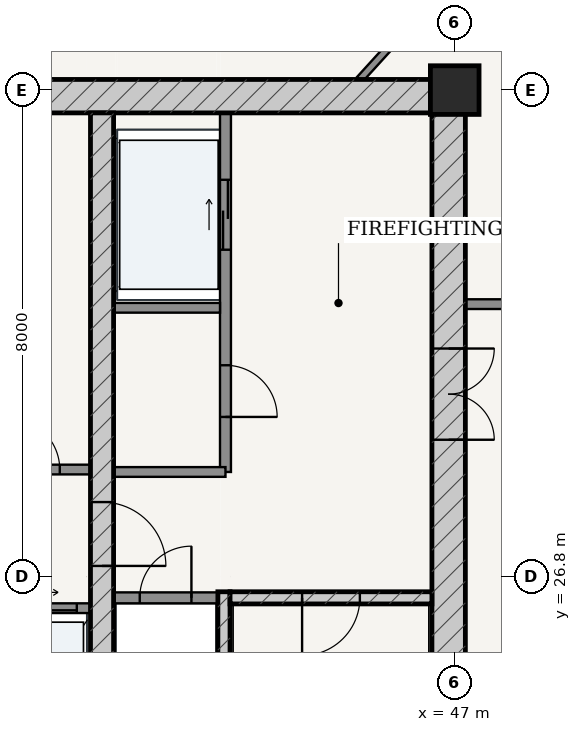
"""IFC4 building model, lengths in metres.
Left out: names, types, materials, properties, quantities, classifications, styles, units other than length and angle.
Written with IfcOpenShell. Run it as: python <this file> out.ifc"""

import sys

from ifc_helpers import new_model, si_unit, direction, frame, frame_2d, origin, origin_2d, place, context, subcontext, project, spatial, rectangle, extrude, source, transform, mapped, element, fill, save


model = new_model("IFC4")
c1 = context("Model", 3, precision=1e-05, world=origin(), true_north=direction((-0.2419218956, 0.970295726276)))
c2 = subcontext(c1, "Body", "Model", "MODEL_VIEW")
j1 = project(units=[si_unit("LENGTHUNIT", "METRE"), si_unit("PLANEANGLEUNIT", "RADIAN")], contexts=[c1])
p1 = place(None, origin())
s1 = spatial("IfcSite", under=j1, at=p1, CompositionType="ELEMENT")
p2 = place(p1, origin())
s2 = spatial("IfcBuilding", under=s1, at=p2, CompositionType="ELEMENT")
p3 = place(p2, frame((0.0, 0.0, 289.45)))
s3 = spatial("IfcBuildingStorey", under=s2, at=p3, CompositionType="ELEMENT", Elevation=289.45)
p4 = place(p3, frame((47.0, 34.8, 0.0), z_axis=(0.0, 0.0, 1.0), x_axis=(1.0, 0.0, 0.0)))
e1 = element("IfcColumn", 1, at=p4, inside=s3, PredefinedType="COLUMN", context=c2, shape_type="SweptSolid", body=[
    extrude(rectangle(XDim=0.8, YDim=0.8, at=origin_2d()), origin(), (0.0, 0.0, 1.0), 3.75),
])
p5 = place(p3, frame((28.825, 34.7, 0.0), z_axis=(0.0, 0.0, 1.0), x_axis=(1.0, 0.0, 0.0)))
e2 = element("IfcWall", 2, at=p5, inside=s3, PredefinedType="SHEAR", context=c2, shape_type="SweptSolid", body=[
    extrude(rectangle(XDim=18.35, YDim=0.55, at=frame_2d((9.175, 0.0))), origin(), (0.0, 0.0, 1.0), 3.49),
])
p6 = place(p3, frame((46.9, 19.175, 0.0), z_axis=(0.0, 0.0, 1.0), x_axis=(0.0, 1.0, 0.0)))
e3 = element("IfcWall", 3, at=p6, inside=s3, PredefinedType="SHEAR", context=c2, shape_type="SweptSolid", body=[
    extrude(rectangle(XDim=15.25, YDim=0.55, at=frame_2d((7.625, 0.0))), origin(), (0.0, 0.0, 1.0), 3.49),
])
p7 = place(p6, frame((9.875, 0.0, 0.0)))
e4 = element("IfcOpeningElement", 4, at=p7, cuts=e3, PredefinedType="OPENING", context=c2, shape_type="SweptSolid", body=[
    extrude(rectangle(XDim=1.5, YDim=2.2, at=frame_2d((0.75, 1.1))), frame((0.0, 0.285, 0.0), z_axis=(0.0, -1.0, 0.0), x_axis=(1.0, 0.0, 0.0)), (0.0, 0.0, 1.0), 0.57),
])
p8 = place(p3, frame((43.205, 19.175, 0.0), z_axis=(0.0, 0.0, 1.0), x_axis=(0.0, 1.0, 0.0)))
e5 = element("IfcWall", 5, at=p8, inside=s3, PredefinedType="SOLIDWALL", context=c2, shape_type="SweptSolid", body=[
    extrude(rectangle(XDim=7.375, YDim=0.2, at=frame_2d((3.688, 0.0))), origin(), (0.0, 0.0, 1.0), 3.49),
])
p9 = place(p3, frame((43.305, 26.45, 0.0), z_axis=(0.0, 0.0, 1.0), x_axis=(1.0, 0.0, 0.0)))
e6 = element("IfcWall", 6, at=p9, inside=s3, PredefinedType="SOLIDWALL", context=c2, shape_type="SweptSolid", body=[
    extrude(rectangle(XDim=3.32, YDim=0.2, at=frame_2d((1.66, 0.0))), origin(), (0.0, 0.0, 1.0), 3.49),
])
p10 = place(p9, frame((1.185, 0.0, 0.0)))
e7 = element("IfcOpeningElement", 7, at=p10, cuts=e6, PredefinedType="OPENING", context=c2, shape_type="SweptSolid", body=[
    extrude(rectangle(XDim=0.95, YDim=2.15, at=frame_2d((0.475, 1.075))), frame((0.0, 0.11, 0.0), z_axis=(0.0, -1.0, 0.0), x_axis=(1.0, 0.0, 0.0)), (0.0, 0.0, 1.0), 0.22),
])
p11 = place(p3, frame((41.2, 19.175, 0.0), z_axis=(0.0, 0.0, 1.0), x_axis=(0.0, 1.0, 0.0)))
e8 = element("IfcWall", 8, at=p11, inside=s3, PredefinedType="SHEAR", context=c2, shape_type="SweptSolid", body=[
    extrude(rectangle(XDim=15.25, YDim=0.38, at=frame_2d((7.625, 0.0))), origin(), (0.0, 0.0, 1.0), 3.49),
])
p12 = place(p11, frame((7.8, 0.0, 0.0)))
e9 = element("IfcOpeningElement", 9, at=p12, cuts=e8, PredefinedType="OPENING", context=c2, shape_type="SweptSolid", body=[
    extrude(rectangle(XDim=1.05, YDim=2.15, at=frame_2d((0.525, 1.075))), frame((0.0, 0.2, 0.0), z_axis=(0.0, -1.0, 0.0), x_axis=(1.0, 0.0, 0.0)), (0.0, 0.0, 1.0), 0.4),
])
p13 = place(p3, frame((41.39, 26.45, 0.0), z_axis=(0.0, 0.0, 1.0), x_axis=(1.0, 0.0, 0.0)))
e10 = element("IfcWall", 10, at=p13, inside=s3, PredefinedType="PARTITIONING", context=c2, shape_type="SweptSolid", body=[
    extrude(rectangle(XDim=1.71, YDim=0.18, at=frame_2d((0.855, 0.0))), origin(), (0.0, 0.0, 1.0), 3.49),
])
p14 = place(p13, frame((0.43, 0.0, 0.0)))
e11 = element("IfcOpeningElement", 11, at=p14, cuts=e10, PredefinedType="OPENING", context=c2, shape_type="SweptSolid", body=[
    extrude(rectangle(XDim=0.85, YDim=2.1, at=frame_2d((0.425, 1.05))), frame((0.0, 0.1, 0.0), z_axis=(0.0, -1.0, 0.0), x_axis=(1.0, 0.0, 0.0)), (0.0, 0.0, 1.0), 0.2),
])
p15 = place(p3, frame((43.23, 28.52, 0.0), z_axis=(0.0, 0.0, 1.0), x_axis=(0.0, 1.0, 0.0)))
e12 = element("IfcWall", 12, at=p15, inside=s3, PredefinedType="PARTITIONING", context=c2, shape_type="SweptSolid", body=[
    extrude(rectangle(XDim=5.905, YDim=0.18, at=frame_2d((2.953, 0.0))), origin(), (0.0, 0.0, 1.0), 3.49),
])
p16 = place(p15, frame((0.905, 0.0, 0.0)))
e13 = element("IfcOpeningElement", 13, at=p16, cuts=e12, PredefinedType="OPENING", context=c2, shape_type="SweptSolid", body=[
    extrude(rectangle(XDim=0.85, YDim=2.1, at=frame_2d((0.425, 1.05))), frame((0.0, 0.1, 0.0), z_axis=(0.0, -1.0, 0.0), x_axis=(1.0, 0.0, 0.0)), (0.0, 0.0, 1.0), 0.2),
])
p17 = place(p15, frame((3.655, 0.0, 0.0)))
e14 = element("IfcOpeningElement", 14, at=p17, cuts=e12, PredefinedType="OPENING", context=c2, shape_type="SweptSolid", body=[
    extrude(rectangle(XDim=1.15, YDim=2.2, at=frame_2d((0.575, 1.1))), frame((0.0, 0.1, 0.0), z_axis=(0.0, -1.0, 0.0), x_axis=(1.0, 0.0, 0.0)), (0.0, 0.0, 1.0), 0.2),
])
p18 = place(p3, frame((41.39, 31.22, 0.0), z_axis=(0.0, 0.0, 1.0), x_axis=(1.0, 0.0, 0.0)))
e15 = element("IfcWall", 15, at=p18, inside=s3, PredefinedType="PARTITIONING", context=c2, shape_type="SweptSolid", body=[
    extrude(rectangle(XDim=1.75, YDim=0.16, at=frame_2d((0.875, 0.0))), origin(), (0.0, 0.0, 1.0), 3.49),
])
p19 = place(p3, frame((41.39, 28.52, 0.0), z_axis=(0.0, 0.0, 1.0), x_axis=(1.0, 0.0, 0.0)))
e16 = element("IfcWall", 16, at=p19, inside=s3, PredefinedType="PARTITIONING", context=c2, shape_type="SweptSolid", body=[
    extrude(rectangle(XDim=1.84, YDim=0.16, at=frame_2d((0.92, 0.0))), origin(), (0.0, 0.0, 1.0), 3.49),
])
p20 = place(p3, frame((34.99, 28.56, 0.0), z_axis=(0.0, 0.0, 1.0), x_axis=(1.0, 0.0, 0.0)))
e17 = element("IfcWall", 17, at=p20, inside=s3, PredefinedType="PARTITIONING", context=c2, shape_type="SweptSolid", body=[
    extrude(rectangle(XDim=6.02, YDim=0.16, at=frame_2d((3.01, 0.0))), origin(), (0.0, 0.0, 1.0), 3.49),
])
p21 = place(p20, frame((0.505, 0.0, 0.0)))
e18 = element("IfcOpeningElement", 18, at=p21, cuts=e17, PredefinedType="OPENING", context=c2, shape_type="SweptSolid", body=[
    extrude(rectangle(XDim=0.85, YDim=2.1, at=frame_2d((0.425, 1.05))), frame((0.0, 0.09, 0.0), z_axis=(0.0, -1.0, 0.0), x_axis=(1.0, 0.0, 0.0)), (0.0, 0.0, 1.0), 0.18),
])
p22 = place(p20, frame((2.58, 0.0, 0.0)))
e19 = element("IfcOpeningElement", 19, at=p22, cuts=e17, PredefinedType="OPENING", context=c2, shape_type="SweptSolid", body=[
    extrude(rectangle(XDim=0.86, YDim=2.1, at=frame_2d((0.43, 1.05))), frame((0.0, 0.09, 0.0), z_axis=(0.0, -1.0, 0.0), x_axis=(1.0, 0.0, 0.0)), (0.0, 0.0, 1.0), 0.18),
])
p23 = place(p20, frame((4.665, 0.0, 0.0)))
e20 = element("IfcOpeningElement", 20, at=p23, cuts=e17, PredefinedType="OPENING", context=c2, shape_type="SweptSolid", body=[
    extrude(rectangle(XDim=0.85, YDim=2.1, at=frame_2d((0.425, 1.05))), frame((0.0, 0.09, 0.0), z_axis=(0.0, -1.0, 0.0), x_axis=(1.0, 0.0, 0.0)), (0.0, 0.0, 1.0), 0.18),
])
p24 = place(p3, frame((34.99, 26.28, 0.0), z_axis=(0.0, 0.0, 1.0), x_axis=(1.0, 0.0, 0.0)))
e21 = element("IfcWall", 21, at=p24, inside=s3, PredefinedType="PARTITIONING", context=c2, shape_type="SweptSolid", body=[
    extrude(rectangle(XDim=6.02, YDim=0.16, at=frame_2d((3.01, 0.0))), origin(), (0.0, 0.0, 1.0), 3.49),
])
p25 = place(p24, frame((1.045, 0.0, 0.0)))
e22 = element("IfcOpeningElement", 22, at=p25, cuts=e21, PredefinedType="OPENING", context=c2, shape_type="SweptSolid", body=[
    extrude(rectangle(XDim=0.85, YDim=2.1, at=frame_2d((0.425, 1.05))), frame((0.0, 0.09, 0.0), z_axis=(0.0, -1.0, 0.0), x_axis=(1.0, 0.0, 0.0)), (0.0, 0.0, 1.0), 0.18),
])
p26 = place(p24, frame((3.215, 0.0, 0.0)))
e23 = element("IfcOpeningElement", 23, at=p26, cuts=e21, PredefinedType="OPENING", context=c2, shape_type="SweptSolid", body=[
    extrude(rectangle(XDim=1.1, YDim=2.2, at=frame_2d((0.55, 1.1))), frame((0.0, 0.09, 0.0), z_axis=(0.0, -1.0, 0.0), x_axis=(1.0, 0.0, 0.0)), (0.0, 0.0, 1.0), 0.18),
])
p27 = place(p24, frame((4.695, 0.0, 0.0)))
e24 = element("IfcOpeningElement", 24, at=p27, cuts=e21, PredefinedType="OPENING", context=c2, shape_type="SweptSolid", body=[
    extrude(rectangle(XDim=1.1, YDim=2.2, at=frame_2d((0.55, 1.1))), frame((0.0, 0.09, 0.0), z_axis=(0.0, -1.0, 0.0), x_axis=(1.0, 0.0, 0.0)), (0.0, 0.0, 1.0), 0.18),
])
p28 = place(p3, frame((47.175, 31.28, 0.0), z_axis=(0.0, 0.0, 1.0), x_axis=(1.0, 0.0, 0.0)))
e25 = element("IfcWall", 25, at=p28, inside=s3, PredefinedType="PARTITIONING", context=c2, shape_type="SweptSolid", body=[
    extrude(rectangle(XDim=1.93, YDim=0.16, at=frame_2d((0.965, 0.0))), origin(), (0.0, 0.0, 1.0), 3.49),
])
p29 = place(p3, frame((39.688, 34.977, 0.0), z_axis=(0.0, 0.0, 1.0), x_axis=(0.202091890364, 0.979366564596, 0.0)))
e26 = element("IfcWall", 26, at=p29, inside=s3, PredefinedType="PARTITIONING", context=c2, shape_type="SweptSolid", body=[
    extrude(rectangle(XDim=10.278, YDim=0.2, at=frame_2d((5.139, 0.0))), origin(), (0.0, 0.0, 1.0), 2.575),
])
p30 = place(p3, frame((45.439, 34.977, 0.0), z_axis=(0.0, 0.0, 1.0), x_axis=(0.672980108938, 0.739660579573, 0.0)))
e27 = element("IfcWall", 27, at=p30, inside=s3, PredefinedType="PARTITIONING", context=c2, shape_type="SweptSolid", body=[
    extrude(rectangle(XDim=3.519, YDim=0.12, at=frame_2d((1.759, 0.0))), origin(), (0.0, 0.0, 1.0), 3.015),
])
p31 = place(p30, frame((1.685, 0.0, 0.0)))
e28 = element("IfcOpeningElement", 28, at=p31, cuts=e27, PredefinedType="OPENING", context=c2, shape_type="SweptSolid", body=[
    extrude(rectangle(XDim=0.86, YDim=2.15, at=frame_2d((0.43, 1.075))), frame((0.0, 0.07, 0.0), z_axis=(0.0, -1.0, 0.0), x_axis=(1.0, 0.0, 0.0)), (0.0, 0.0, 1.0), 0.14),
])
m1 = source(origin(), c2, "Body", "SweptSolid", [
    extrude(rectangle(XDim=1.5, YDim=2.2, at=frame_2d((0.75, 1.1))), frame((0.0, 0.025, 0.0), z_axis=(0.0, -1.0, 0.0), x_axis=(1.0, 0.0, 0.0)), (0.0, 0.0, 1.0), 0.05),
])
p32 = place(p7, frame((1.5, 0.0, 0.0), z_axis=(0.0, 0.0, 1.0), x_axis=(-1.0, 0.0, 0.0)))
e29 = element("IfcDoor", 29, at=p32, inside=s3, OperationType="DOUBLE_DOOR_SINGLE_SWING", PredefinedType="DOOR", context=c2, shape_type="MappedRepresentation", body=[
    mapped(m1, transform((0.0, 0.0, 0.0), scale=1.0)),
])
fill(e4, e29)
m2 = source(origin(), c2, "Body", "SweptSolid", [
    extrude(rectangle(XDim=1.05, YDim=2.15, at=frame_2d((0.525, 1.075))), frame((0.0, 0.025, 0.0), z_axis=(0.0, -1.0, 0.0), x_axis=(1.0, 0.0, 0.0)), (0.0, 0.0, 1.0), 0.05),
])
p33 = place(p12, frame((1.05, 0.0, 0.0), z_axis=(0.0, 0.0, 1.0), x_axis=(-1.0, 0.0, 0.0)))
e30 = element("IfcDoor", 30, at=p33, inside=s3, OperationType="SINGLE_SWING_RIGHT", PredefinedType="DOOR", context=c2, shape_type="MappedRepresentation", body=[
    mapped(m2, transform((0.0, 0.0, 0.0), scale=1.0)),
])
fill(e9, e30)
m3 = source(origin(), c2, "Body", "SweptSolid", [
    extrude(rectangle(XDim=0.95, YDim=2.15, at=frame_2d((0.475, 1.075))), frame((0.0, 0.025, 0.0), z_axis=(0.0, -1.0, 0.0), x_axis=(1.0, 0.0, 0.0)), (0.0, 0.0, 1.0), 0.05),
])
p34 = place(p10, frame((0.95, 0.0, 0.0), z_axis=(0.0, 0.0, 1.0), x_axis=(-1.0, 0.0, 0.0)))
e31 = element("IfcDoor", 31, at=p34, inside=s3, OperationType="SINGLE_SWING_RIGHT", PredefinedType="DOOR", context=c2, shape_type="MappedRepresentation", body=[
    mapped(m3, transform((0.0, 0.0, 0.0), scale=1.0)),
])
fill(e7, e31)
m4 = source(origin(), c2, "Body", "SweptSolid", [
    extrude(rectangle(XDim=0.85, YDim=2.1, at=frame_2d((0.425, 1.05))), frame((0.0, 0.025, 0.0), z_axis=(0.0, -1.0, 0.0), x_axis=(1.0, 0.0, 0.0)), (0.0, 0.0, 1.0), 0.05),
])
p35 = place(p14, origin())
e32 = element("IfcDoor", 32, at=p35, inside=s3, OperationType="SINGLE_SWING_RIGHT", PredefinedType="DOOR", context=c2, shape_type="MappedRepresentation", body=[
    mapped(m4, transform((0.0, 0.0, 0.0), scale=1.0)),
])
fill(e11, e32)
p36 = place(p16, frame((0.85, 0.0, 0.0), z_axis=(0.0, 0.0, 1.0), x_axis=(-1.0, 0.0, 0.0)))
e33 = element("IfcDoor", 33, at=p36, inside=s3, OperationType="SINGLE_SWING_RIGHT", PredefinedType="DOOR", context=c2, shape_type="MappedRepresentation", body=[
    mapped(m4, transform((0.0, 0.0, 0.0), scale=1.0)),
])
fill(e13, e33)
p37 = place(p23, origin())
e34 = element("IfcDoor", 34, at=p37, inside=s3, OperationType="SINGLE_SWING_LEFT", PredefinedType="DOOR", context=c2, shape_type="MappedRepresentation", body=[
    mapped(m4, transform((0.0, 0.0, 0.0), scale=1.0)),
])
fill(e20, e34)
m5 = source(origin(), c2, "Body", "SweptSolid", [
    extrude(rectangle(XDim=1.15, YDim=2.2, at=frame_2d((0.575, 1.1))), frame((0.0, 0.025, 0.0), z_axis=(0.0, -1.0, 0.0), x_axis=(1.0, 0.0, 0.0)), (0.0, 0.0, 1.0), 0.05),
])
p38 = place(p17, origin())
e35 = element("IfcDoor", 35, at=p38, inside=s3, OperationType="DOUBLE_DOOR_SLIDING", PredefinedType="DOOR", context=c2, shape_type="MappedRepresentation", body=[
    mapped(m5, transform((0.0, 0.0, 0.0), scale=1.0)),
])
fill(e14, e35)
m6 = source(origin(), c2, "Body", "SweptSolid", [
    extrude(rectangle(XDim=1.1, YDim=2.2, at=frame_2d((0.55, 1.1))), frame((0.0, 0.025, 0.0), z_axis=(0.0, -1.0, 0.0), x_axis=(1.0, 0.0, 0.0)), (0.0, 0.0, 1.0), 0.05),
])
p39 = place(p27, origin())
e36 = element("IfcDoor", 36, at=p39, inside=s3, OperationType="DOUBLE_DOOR_SLIDING", PredefinedType="DOOR", context=c2, shape_type="MappedRepresentation", body=[
    mapped(m6, transform((0.0, 0.0, 0.0), scale=1.0)),
])
fill(e24, e36)
save(model, sys.argv[1])
